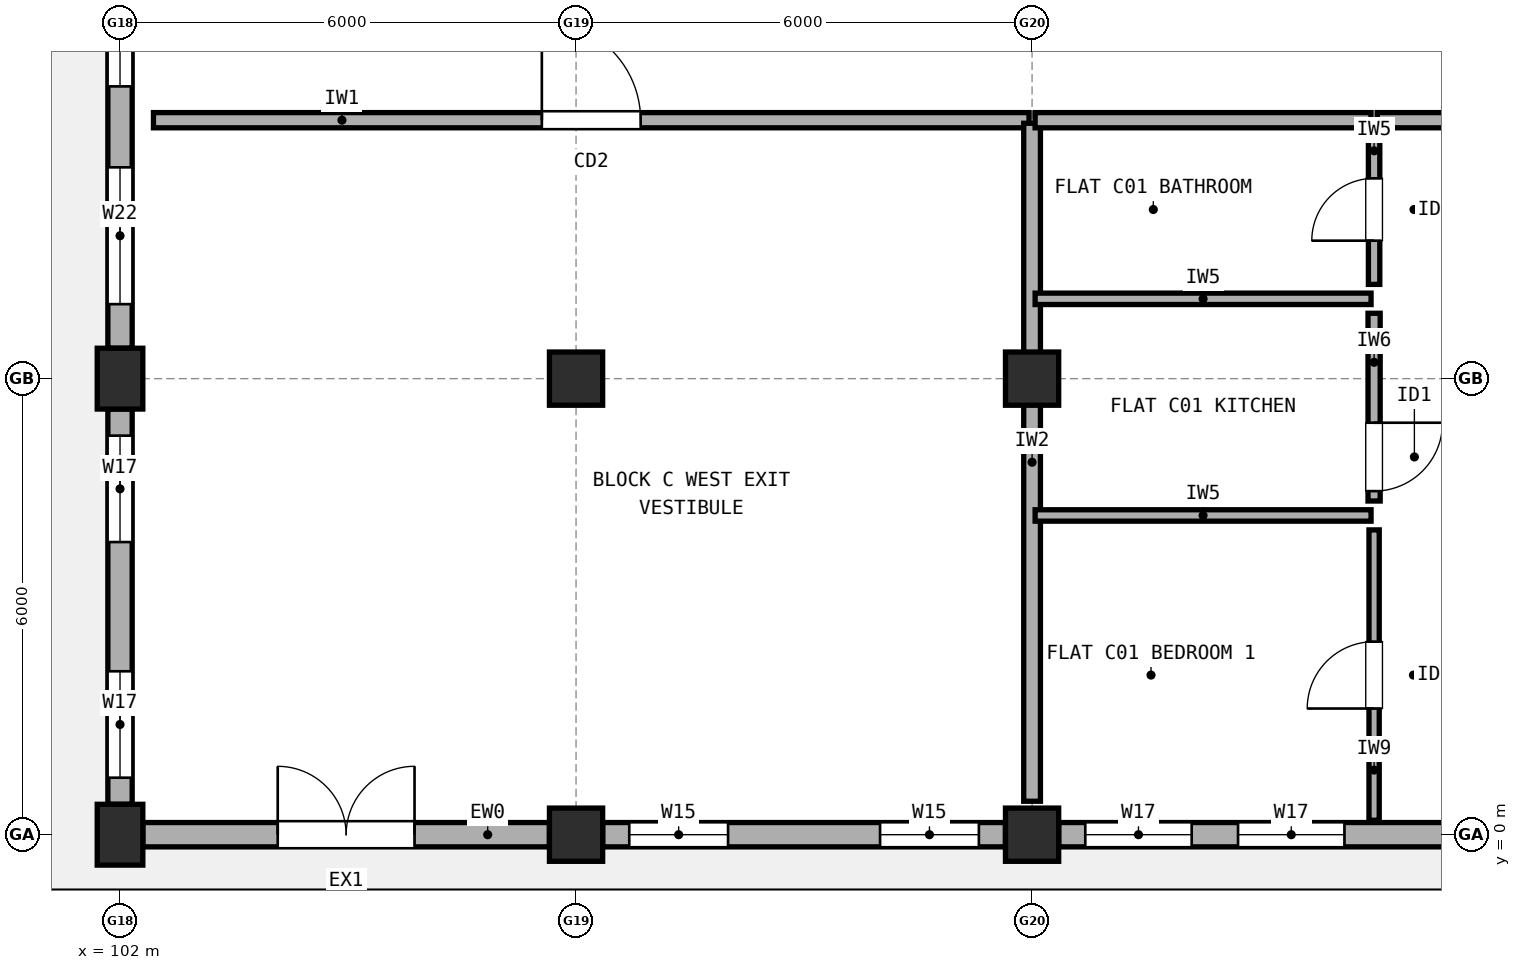
"""IFC4 building model, lengths in metres.
Left out: names, types, materials, properties, quantities, classifications, styles, units other than length and angle.
Written with IfcOpenShell. Run it as: python <this file> out.ifc"""

import sys

from ifc_helpers import new_model, si_unit, direction, frame, frame_2d, origin, origin_2d, place, context, subcontext, project, spatial, rectangle, extrude, element, fill, save


model = new_model("IFC4")
c1 = context("Model", 3, precision=1e-05, world=origin(), true_north=direction((0.0, 1.0)))
c2 = subcontext(c1, "Body", "Model", "MODEL_VIEW")
j1 = project(units=[si_unit("LENGTHUNIT", "METRE"), si_unit("PLANEANGLEUNIT", "RADIAN")], contexts=[c1])
p1 = place(None, origin())
s1 = spatial("IfcSite", under=j1, at=p1, CompositionType="ELEMENT")
p2 = place(p1, origin())
s2 = spatial("IfcBuilding", under=s1, at=p2, CompositionType="ELEMENT")
p3 = place(p2, origin())
s3 = spatial("IfcBuildingStorey", under=s2, at=p3, CompositionType="ELEMENT", Elevation=0.0)
for number, where, z_axis, x_axis in (
    (1, (102.0, 0.0, 0.0), (0.0, 0.0, 1.0), (1.0, 0.0, 0.0)),
    (2, (102.0, 6.0, 0.0), (0.0, 0.0, 1.0), (1.0, 0.0, 0.0)),
):
    element("IfcColumn", number, at=place(p3, frame(where, z_axis=z_axis, x_axis=x_axis)), inside=s3, PredefinedType="COLUMN", context=c2, shape_type="SweptSolid", body=[
        extrude(rectangle(XDim=0.6, YDim=0.8, at=origin_2d()), origin(), (0.0, 0.0, 1.0), 4.23),
    ])
for number, where, z_axis, x_axis in (
    (3, (108.0, 0.0, 0.0), (0.0, 0.0, 1.0), (1.0, 0.0, 0.0)),
    (4, (108.0, 6.0, 0.0), (0.0, 0.0, 1.0), (1.0, 0.0, 0.0)),
    (5, (114.0, 0.0, 0.0), (0.0, 0.0, 1.0), (1.0, 0.0, 0.0)),
    (6, (114.0, 6.0, 0.0), (0.0, 0.0, 1.0), (1.0, 0.0, 0.0)),
):
    element("IfcColumn", number, at=place(p3, frame(where, z_axis=z_axis, x_axis=x_axis)), inside=s3, PredefinedType="COLUMN", context=c2, shape_type="SweptSolid", body=[
        extrude(rectangle(XDim=0.7, YDim=0.7, at=origin_2d()), origin(), (0.0, 0.0, 1.0), 4.23),
    ])
p4 = place(p3, frame((102.3, 0.0, 0.0), z_axis=(0.0, 0.0, 1.0), x_axis=(1.0, 0.0, 0.0)))
e7 = element("IfcWall", 7, at=p4, inside=s3, PredefinedType="STANDARD", context=c2, shape_type="SweptSolid", body=[
    extrude(rectangle(XDim=5.35, YDim=0.32, at=frame_2d((2.675, 0.0))), origin(), (0.0, 0.0, 1.0), 3.562),
])
p5 = place(p4, frame((1.775, 0.0, 0.0)))
e8 = element("IfcOpeningElement", 8, at=p5, cuts=e7, PredefinedType="OPENING", context=c2, shape_type="SweptSolid", body=[
    extrude(rectangle(XDim=1.8, YDim=2.2, at=frame_2d((0.9, 1.1))), frame((0.0, 0.17, 0.0), z_axis=(0.0, -1.0, 0.0), x_axis=(1.0, 0.0, 0.0)), (0.0, 0.0, 1.0), 0.34),
])
p6 = place(p3, frame((108.35, 0.0, 0.0), z_axis=(0.0, 0.0, 1.0), x_axis=(1.0, 0.0, 0.0)))
e9 = element("IfcWall", 9, at=p6, inside=s3, PredefinedType="STANDARD", context=c2, shape_type="SweptSolid", body=[
    extrude(rectangle(XDim=5.3, YDim=0.32, at=frame_2d((2.65, 0.0))), origin(), (0.0, 0.0, 1.0), 3.562),
])
p7 = place(p6, frame((0.35, 0.0, 0.9)))
e10 = element("IfcOpeningElement", 10, at=p7, cuts=e9, PredefinedType="OPENING", context=c2, shape_type="SweptSolid", body=[
    extrude(rectangle(XDim=1.3, YDim=1.45, at=frame_2d((0.65, 0.725))), frame((0.0, 0.17, 0.0), z_axis=(0.0, -1.0, 0.0), x_axis=(1.0, 0.0, 0.0)), (0.0, 0.0, 1.0), 0.34),
])
p8 = place(p6, frame((3.65, 0.0, 0.9)))
e11 = element("IfcOpeningElement", 11, at=p8, cuts=e9, PredefinedType="OPENING", context=c2, shape_type="SweptSolid", body=[
    extrude(rectangle(XDim=1.3, YDim=1.45, at=frame_2d((0.65, 0.725))), frame((0.0, 0.17, 0.0), z_axis=(0.0, -1.0, 0.0), x_axis=(1.0, 0.0, 0.0)), (0.0, 0.0, 1.0), 0.34),
])
p9 = place(p3, frame((114.35, 0.0, 0.0), z_axis=(0.0, 0.0, 1.0), x_axis=(1.0, 0.0, 0.0)))
e12 = element("IfcWall", 12, at=p9, inside=s3, PredefinedType="STANDARD", context=c2, shape_type="SweptSolid", body=[
    extrude(rectangle(XDim=5.3, YDim=0.32, at=frame_2d((2.65, 0.0))), origin(), (0.0, 0.0, 1.0), 3.562),
])
p10 = place(p9, frame((0.35, 0.0, 0.9)))
e13 = element("IfcOpeningElement", 13, at=p10, cuts=e12, PredefinedType="OPENING", context=c2, shape_type="SweptSolid", body=[
    extrude(rectangle(XDim=1.4, YDim=1.5, at=frame_2d((0.7, 0.75))), frame((0.0, 0.17, 0.0), z_axis=(0.0, -1.0, 0.0), x_axis=(1.0, 0.0, 0.0)), (0.0, 0.0, 1.0), 0.34),
])
p11 = place(p9, frame((2.36, 0.0, 0.9)))
e14 = element("IfcOpeningElement", 14, at=p11, cuts=e12, PredefinedType="OPENING", context=c2, shape_type="SweptSolid", body=[
    extrude(rectangle(XDim=1.4, YDim=1.5, at=frame_2d((0.7, 0.75))), frame((0.0, 0.17, 0.0), z_axis=(0.0, -1.0, 0.0), x_axis=(1.0, 0.0, 0.0)), (0.0, 0.0, 1.0), 0.34),
])
p12 = place(p3, frame((102.0, 11.6, 0.0), z_axis=(0.0, 0.0, 1.0), x_axis=(0.0, -1.0, 0.0)))
e15 = element("IfcWall", 15, at=p12, inside=s3, PredefinedType="STANDARD", context=c2, shape_type="SweptSolid", body=[
    extrude(rectangle(XDim=5.2, YDim=0.32, at=frame_2d((2.6, 0.0))), origin(), (0.0, 0.0, 1.0), 3.712),
])
p13 = place(p12, frame((0.405, 0.0, 0.9)))
e16 = element("IfcOpeningElement", 16, at=p13, cuts=e15, PredefinedType="OPENING", context=c2, shape_type="SweptSolid", body=[
    extrude(rectangle(XDim=1.35, YDim=1.5, at=frame_2d((0.675, 0.75))), frame((0.0, 0.17, 0.0), z_axis=(0.0, -1.0, 0.0), x_axis=(1.0, 0.0, 0.0)), (0.0, 0.0, 1.0), 0.34),
])
p14 = place(p12, frame((2.82, 0.0, 0.9)))
e17 = element("IfcOpeningElement", 17, at=p14, cuts=e15, PredefinedType="OPENING", context=c2, shape_type="SweptSolid", body=[
    extrude(rectangle(XDim=1.8, YDim=1.45, at=frame_2d((0.9, 0.725))), frame((0.0, 0.17, 0.0), z_axis=(0.0, -1.0, 0.0), x_axis=(1.0, 0.0, 0.0)), (0.0, 0.0, 1.0), 0.34),
])
p15 = place(p3, frame((102.0, 5.6, 0.0), z_axis=(0.0, 0.0, 1.0), x_axis=(0.0, -1.0, 0.0)))
e18 = element("IfcWall", 18, at=p15, inside=s3, PredefinedType="STANDARD", context=c2, shape_type="SweptSolid", body=[
    extrude(rectangle(XDim=5.2, YDim=0.32, at=frame_2d((2.6, 0.0))), origin(), (0.0, 0.0, 1.0), 3.712),
])
p16 = place(p15, frame((0.35, 0.0, 0.9)))
e19 = element("IfcOpeningElement", 19, at=p16, cuts=e18, PredefinedType="OPENING", context=c2, shape_type="SweptSolid", body=[
    extrude(rectangle(XDim=1.4, YDim=1.5, at=frame_2d((0.7, 0.75))), frame((0.0, 0.17, 0.0), z_axis=(0.0, -1.0, 0.0), x_axis=(1.0, 0.0, 0.0)), (0.0, 0.0, 1.0), 0.34),
])
p17 = place(p15, frame((3.45, 0.0, 0.9)))
e20 = element("IfcOpeningElement", 20, at=p17, cuts=e18, PredefinedType="OPENING", context=c2, shape_type="SweptSolid", body=[
    extrude(rectangle(XDim=1.4, YDim=1.5, at=frame_2d((0.7, 0.75))), frame((0.0, 0.17, 0.0), z_axis=(0.0, -1.0, 0.0), x_axis=(1.0, 0.0, 0.0)), (0.0, 0.0, 1.0), 0.34),
])
p18 = place(p3, frame((102.44, 9.4, 0.0), z_axis=(0.0, 0.0, 1.0), x_axis=(1.0, 0.0, 0.0)))
e21 = element("IfcWall", 21, at=p18, inside=s3, PredefinedType="SOLIDWALL", context=c2, shape_type="SweptSolid", body=[
    extrude(rectangle(XDim=11.52, YDim=0.2, at=frame_2d((5.76, 0.0))), origin(), (0.0, 0.0, 1.0), 3.612),
])
p19 = place(p18, frame((5.11, 0.0, 0.0)))
e22 = element("IfcOpeningElement", 22, at=p19, cuts=e21, PredefinedType="OPENING", context=c2, shape_type="SweptSolid", body=[
    extrude(rectangle(XDim=1.3, YDim=2.15, at=frame_2d((0.65, 1.075))), frame((0.0, 0.11, 0.0), z_axis=(0.0, -1.0, 0.0), x_axis=(1.0, 0.0, 0.0)), (0.0, 0.0, 1.0), 0.22),
])
p20 = place(p3, frame((114.0, 0.44, 0.0), z_axis=(0.0, 0.0, 1.0), x_axis=(0.0, 1.0, 0.0)))
e23 = element("IfcWall", 23, at=p20, inside=s3, PredefinedType="SOLIDWALL", context=c2, shape_type="SweptSolid", body=[
    extrude(rectangle(XDim=8.92, YDim=0.22, at=frame_2d((4.46, 0.0))), origin(), (0.0, 0.0, 1.0), 3.612),
])
p21 = place(p3, frame((114.04, 9.4, 0.0), z_axis=(0.0, 0.0, 1.0), x_axis=(1.0, 0.0, 0.0)))
e24 = element("IfcWall", 24, at=p21, inside=s3, PredefinedType="SOLIDWALL", context=c2, shape_type="SweptSolid", body=[
    extrude(rectangle(XDim=4.42, YDim=0.2, at=frame_2d((2.21, 0.0))), origin(), (0.0, 0.0, 1.0), 3.612),
])
p22 = place(p3, frame((118.54, 9.4, 0.0), z_axis=(0.0, 0.0, 1.0), x_axis=(1.0, 0.0, 0.0)))
e25 = element("IfcWall", 25, at=p22, inside=s3, PredefinedType="SOLIDWALL", context=c2, shape_type="SweptSolid", body=[
    extrude(rectangle(XDim=4.42, YDim=0.2, at=frame_2d((2.21, 0.0))), origin(), (0.0, 0.0, 1.0), 3.612),
])
p23 = place(p22, frame((1.71, 0.0, 0.0)))
e26 = element("IfcOpeningElement", 26, at=p23, cuts=e25, PredefinedType="OPENING", context=c2, shape_type="SweptSolid", body=[
    extrude(rectangle(XDim=1.0, YDim=2.15, at=frame_2d((0.5, 1.075))), frame((0.0, 0.11, 0.0), z_axis=(0.0, -1.0, 0.0), x_axis=(1.0, 0.0, 0.0)), (0.0, 0.0, 1.0), 0.22),
])
p24 = place(p3, frame((118.5, 0.19, 0.0), z_axis=(0.0, 0.0, 1.0), x_axis=(0.0, 1.0, 0.0)))
e27 = element("IfcWall", 27, at=p24, inside=s3, PredefinedType="PARTITIONING", context=c2, shape_type="SweptSolid", body=[
    extrude(rectangle(XDim=3.82, YDim=0.135, at=frame_2d((1.91, 0.0))), origin(), (0.0, 0.0, 1.0), 4.23),
])
p25 = place(p24, frame((1.47, 0.0, 0.0)))
e28 = element("IfcOpeningElement", 28, at=p25, cuts=e27, PredefinedType="OPENING", context=c2, shape_type="SweptSolid", body=[
    extrude(rectangle(XDim=0.88, YDim=2.1, at=frame_2d((0.44, 1.05))), frame((0.0, 0.077, 0.0), z_axis=(0.0, -1.0, 0.0), x_axis=(1.0, 0.0, 0.0)), (0.0, 0.0, 1.0), 0.155),
])
p26 = place(p3, frame((118.5, 4.39, 0.0), z_axis=(0.0, 0.0, 1.0), x_axis=(0.0, 1.0, 0.0)))
e29 = element("IfcWall", 29, at=p26, inside=s3, PredefinedType="PLUMBINGWALL", context=c2, shape_type="SweptSolid", body=[
    extrude(rectangle(XDim=2.47, YDim=0.16, at=frame_2d((1.235, 0.0))), origin(), (0.0, 0.0, 1.0), 3.112),
])
p27 = place(p26, frame((0.13, 0.0, 0.0)))
e30 = element("IfcOpeningElement", 30, at=p27, cuts=e29, PredefinedType="OPENING", context=c2, shape_type="SweptSolid", body=[
    extrude(rectangle(XDim=0.9, YDim=2.1, at=frame_2d((0.45, 1.05))), frame((0.0, 0.09, 0.0), z_axis=(0.0, -1.0, 0.0), x_axis=(1.0, 0.0, 0.0)), (0.0, 0.0, 1.0), 0.18),
])
p28 = place(p3, frame((118.5, 7.24, 0.0), z_axis=(0.0, 0.0, 1.0), x_axis=(0.0, 1.0, 0.0)))
e31 = element("IfcWall", 31, at=p28, inside=s3, PredefinedType="PARTITIONING", context=c2, shape_type="SweptSolid", body=[
    extrude(rectangle(XDim=1.97, YDim=0.15, at=frame_2d((0.985, 0.0))), origin(), (0.0, 0.0, 1.0), 4.23),
])
p29 = place(p28, frame((0.575, 0.0, 0.0)))
e32 = element("IfcOpeningElement", 32, at=p29, cuts=e31, PredefinedType="OPENING", context=c2, shape_type="SweptSolid", body=[
    extrude(rectangle(XDim=0.82, YDim=2.08, at=frame_2d((0.41, 1.04))), frame((0.0, 0.085, 0.0), z_axis=(0.0, -1.0, 0.0), x_axis=(1.0, 0.0, 0.0)), (0.0, 0.0, 1.0), 0.17),
])
for number, where, z_axis, x_axis in (
    (33, (114.04, 4.2, 0.0), (0.0, 0.0, 1.0), (1.0, 0.0, 0.0)),
    (34, (114.04, 7.05, 0.0), (0.0, 0.0, 1.0), (1.0, 0.0, 0.0)),
):
    element("IfcWall", number, at=place(p3, frame(where, z_axis=z_axis, x_axis=x_axis)), inside=s3, PredefinedType="PARTITIONING", context=c2, shape_type="SweptSolid", body=[
        extrude(rectangle(XDim=4.42, YDim=0.15, at=frame_2d((2.21, 0.0))), origin(), (0.0, 0.0, 1.0), 3.612),
    ])
p30 = place(p5, frame((1.8, 0.0, 0.0), z_axis=(0.0, 0.0, 1.0), x_axis=(-1.0, 0.0, 0.0)))
e35 = element("IfcDoor", 35, at=p30, inside=s3, OperationType="DOUBLE_DOOR_SINGLE_SWING", PredefinedType="DOOR", context=c2, shape_type="SweptSolid", body=[
    extrude(rectangle(XDim=1.8, YDim=2.2, at=frame_2d((0.9, 1.1))), frame((0.0, 0.025, 0.0), z_axis=(0.0, -1.0, 0.0), x_axis=(1.0, 0.0, 0.0)), (0.0, 0.0, 1.0), 0.05),
])
fill(e8, e35)
p31 = place(p7, origin())
e36 = element("IfcWindow", 36, at=p31, inside=s3, PartitioningType="SINGLE_PANEL", PredefinedType="WINDOW", context=c2, shape_type="SweptSolid", body=[
    extrude(rectangle(XDim=1.3, YDim=1.45, at=frame_2d((0.65, 0.725))), frame((0.0, 0.03, 0.0), z_axis=(0.0, -1.0, 0.0), x_axis=(1.0, 0.0, 0.0)), (0.0, 0.0, 1.0), 0.06),
])
fill(e10, e36)
p32 = place(p8, origin())
e37 = element("IfcWindow", 37, at=p32, inside=s3, PartitioningType="SINGLE_PANEL", PredefinedType="WINDOW", context=c2, shape_type="SweptSolid", body=[
    extrude(rectangle(XDim=1.3, YDim=1.45, at=frame_2d((0.65, 0.725))), frame((0.0, 0.03, 0.0), z_axis=(0.0, -1.0, 0.0), x_axis=(1.0, 0.0, 0.0)), (0.0, 0.0, 1.0), 0.06),
])
fill(e11, e37)
p33 = place(p10, origin())
e38 = element("IfcWindow", 38, at=p33, inside=s3, PartitioningType="SINGLE_PANEL", PredefinedType="WINDOW", context=c2, shape_type="SweptSolid", body=[
    extrude(rectangle(XDim=1.4, YDim=1.5, at=frame_2d((0.7, 0.75))), frame((0.0, 0.03, 0.0), z_axis=(0.0, -1.0, 0.0), x_axis=(1.0, 0.0, 0.0)), (0.0, 0.0, 1.0), 0.06),
])
fill(e13, e38)
p34 = place(p11, origin())
e39 = element("IfcWindow", 39, at=p34, inside=s3, PartitioningType="SINGLE_PANEL", PredefinedType="WINDOW", context=c2, shape_type="SweptSolid", body=[
    extrude(rectangle(XDim=1.4, YDim=1.5, at=frame_2d((0.7, 0.75))), frame((0.0, 0.03, 0.0), z_axis=(0.0, -1.0, 0.0), x_axis=(1.0, 0.0, 0.0)), (0.0, 0.0, 1.0), 0.06),
])
fill(e14, e39)
p35 = place(p13, origin())
e40 = element("IfcWindow", 40, at=p35, inside=s3, PartitioningType="SINGLE_PANEL", PredefinedType="WINDOW", context=c2, shape_type="SweptSolid", body=[
    extrude(rectangle(XDim=1.35, YDim=1.5, at=frame_2d((0.675, 0.75))), frame((0.0, 0.03, 0.0), z_axis=(0.0, -1.0, 0.0), x_axis=(1.0, 0.0, 0.0)), (0.0, 0.0, 1.0), 0.06),
])
fill(e16, e40)
p36 = place(p14, origin())
e41 = element("IfcWindow", 41, at=p36, inside=s3, PartitioningType="SINGLE_PANEL", PredefinedType="WINDOW", context=c2, shape_type="SweptSolid", body=[
    extrude(rectangle(XDim=1.8, YDim=1.45, at=frame_2d((0.9, 0.725))), frame((0.0, 0.03, 0.0), z_axis=(0.0, -1.0, 0.0), x_axis=(1.0, 0.0, 0.0)), (0.0, 0.0, 1.0), 0.06),
])
fill(e17, e41)
p37 = place(p16, origin())
e42 = element("IfcWindow", 42, at=p37, inside=s3, PartitioningType="SINGLE_PANEL", PredefinedType="WINDOW", context=c2, shape_type="SweptSolid", body=[
    extrude(rectangle(XDim=1.4, YDim=1.5, at=frame_2d((0.7, 0.75))), frame((0.0, 0.03, 0.0), z_axis=(0.0, -1.0, 0.0), x_axis=(1.0, 0.0, 0.0)), (0.0, 0.0, 1.0), 0.06),
])
fill(e19, e42)
p38 = place(p17, origin())
e43 = element("IfcWindow", 43, at=p38, inside=s3, PartitioningType="SINGLE_PANEL", PredefinedType="WINDOW", context=c2, shape_type="SweptSolid", body=[
    extrude(rectangle(XDim=1.4, YDim=1.5, at=frame_2d((0.7, 0.75))), frame((0.0, 0.03, 0.0), z_axis=(0.0, -1.0, 0.0), x_axis=(1.0, 0.0, 0.0)), (0.0, 0.0, 1.0), 0.06),
])
fill(e20, e43)
p39 = place(p19, origin())
e44 = element("IfcDoor", 44, at=p39, inside=s3, OperationType="SINGLE_SWING_LEFT", PredefinedType="DOOR", context=c2, shape_type="SweptSolid", body=[
    extrude(rectangle(XDim=1.3, YDim=2.15, at=frame_2d((0.65, 1.075))), frame((0.0, 0.025, 0.0), z_axis=(0.0, -1.0, 0.0), x_axis=(1.0, 0.0, 0.0)), (0.0, 0.0, 1.0), 0.05),
])
fill(e22, e44)
p40 = place(p25, origin())
e45 = element("IfcDoor", 45, at=p40, inside=s3, OperationType="SINGLE_SWING_LEFT", PredefinedType="DOOR", context=c2, shape_type="SweptSolid", body=[
    extrude(rectangle(XDim=0.88, YDim=2.1, at=frame_2d((0.44, 1.05))), frame((0.0, 0.025, 0.0), z_axis=(0.0, -1.0, 0.0), x_axis=(1.0, 0.0, 0.0)), (0.0, 0.0, 1.0), 0.05),
])
fill(e28, e45)
p41 = place(p27, origin())
e46 = element("IfcDoor", 46, at=p41, inside=s3, OperationType="SINGLE_SWING_RIGHT", PredefinedType="DOOR", context=c2, shape_type="SweptSolid", body=[
    extrude(rectangle(XDim=0.9, YDim=2.1, at=frame_2d((0.45, 1.05))), frame((0.0, 0.025, 0.0), z_axis=(0.0, -1.0, 0.0), x_axis=(1.0, 0.0, 0.0)), (0.0, 0.0, 1.0), 0.05),
])
fill(e30, e46)
p42 = place(p29, origin())
e47 = element("IfcDoor", 47, at=p42, inside=s3, OperationType="SINGLE_SWING_LEFT", PredefinedType="DOOR", context=c2, shape_type="SweptSolid", body=[
    extrude(rectangle(XDim=0.82, YDim=2.08, at=frame_2d((0.41, 1.04))), frame((0.0, 0.025, 0.0), z_axis=(0.0, -1.0, 0.0), x_axis=(1.0, 0.0, 0.0)), (0.0, 0.0, 1.0), 0.05),
])
fill(e32, e47)
save(model, sys.argv[1])
